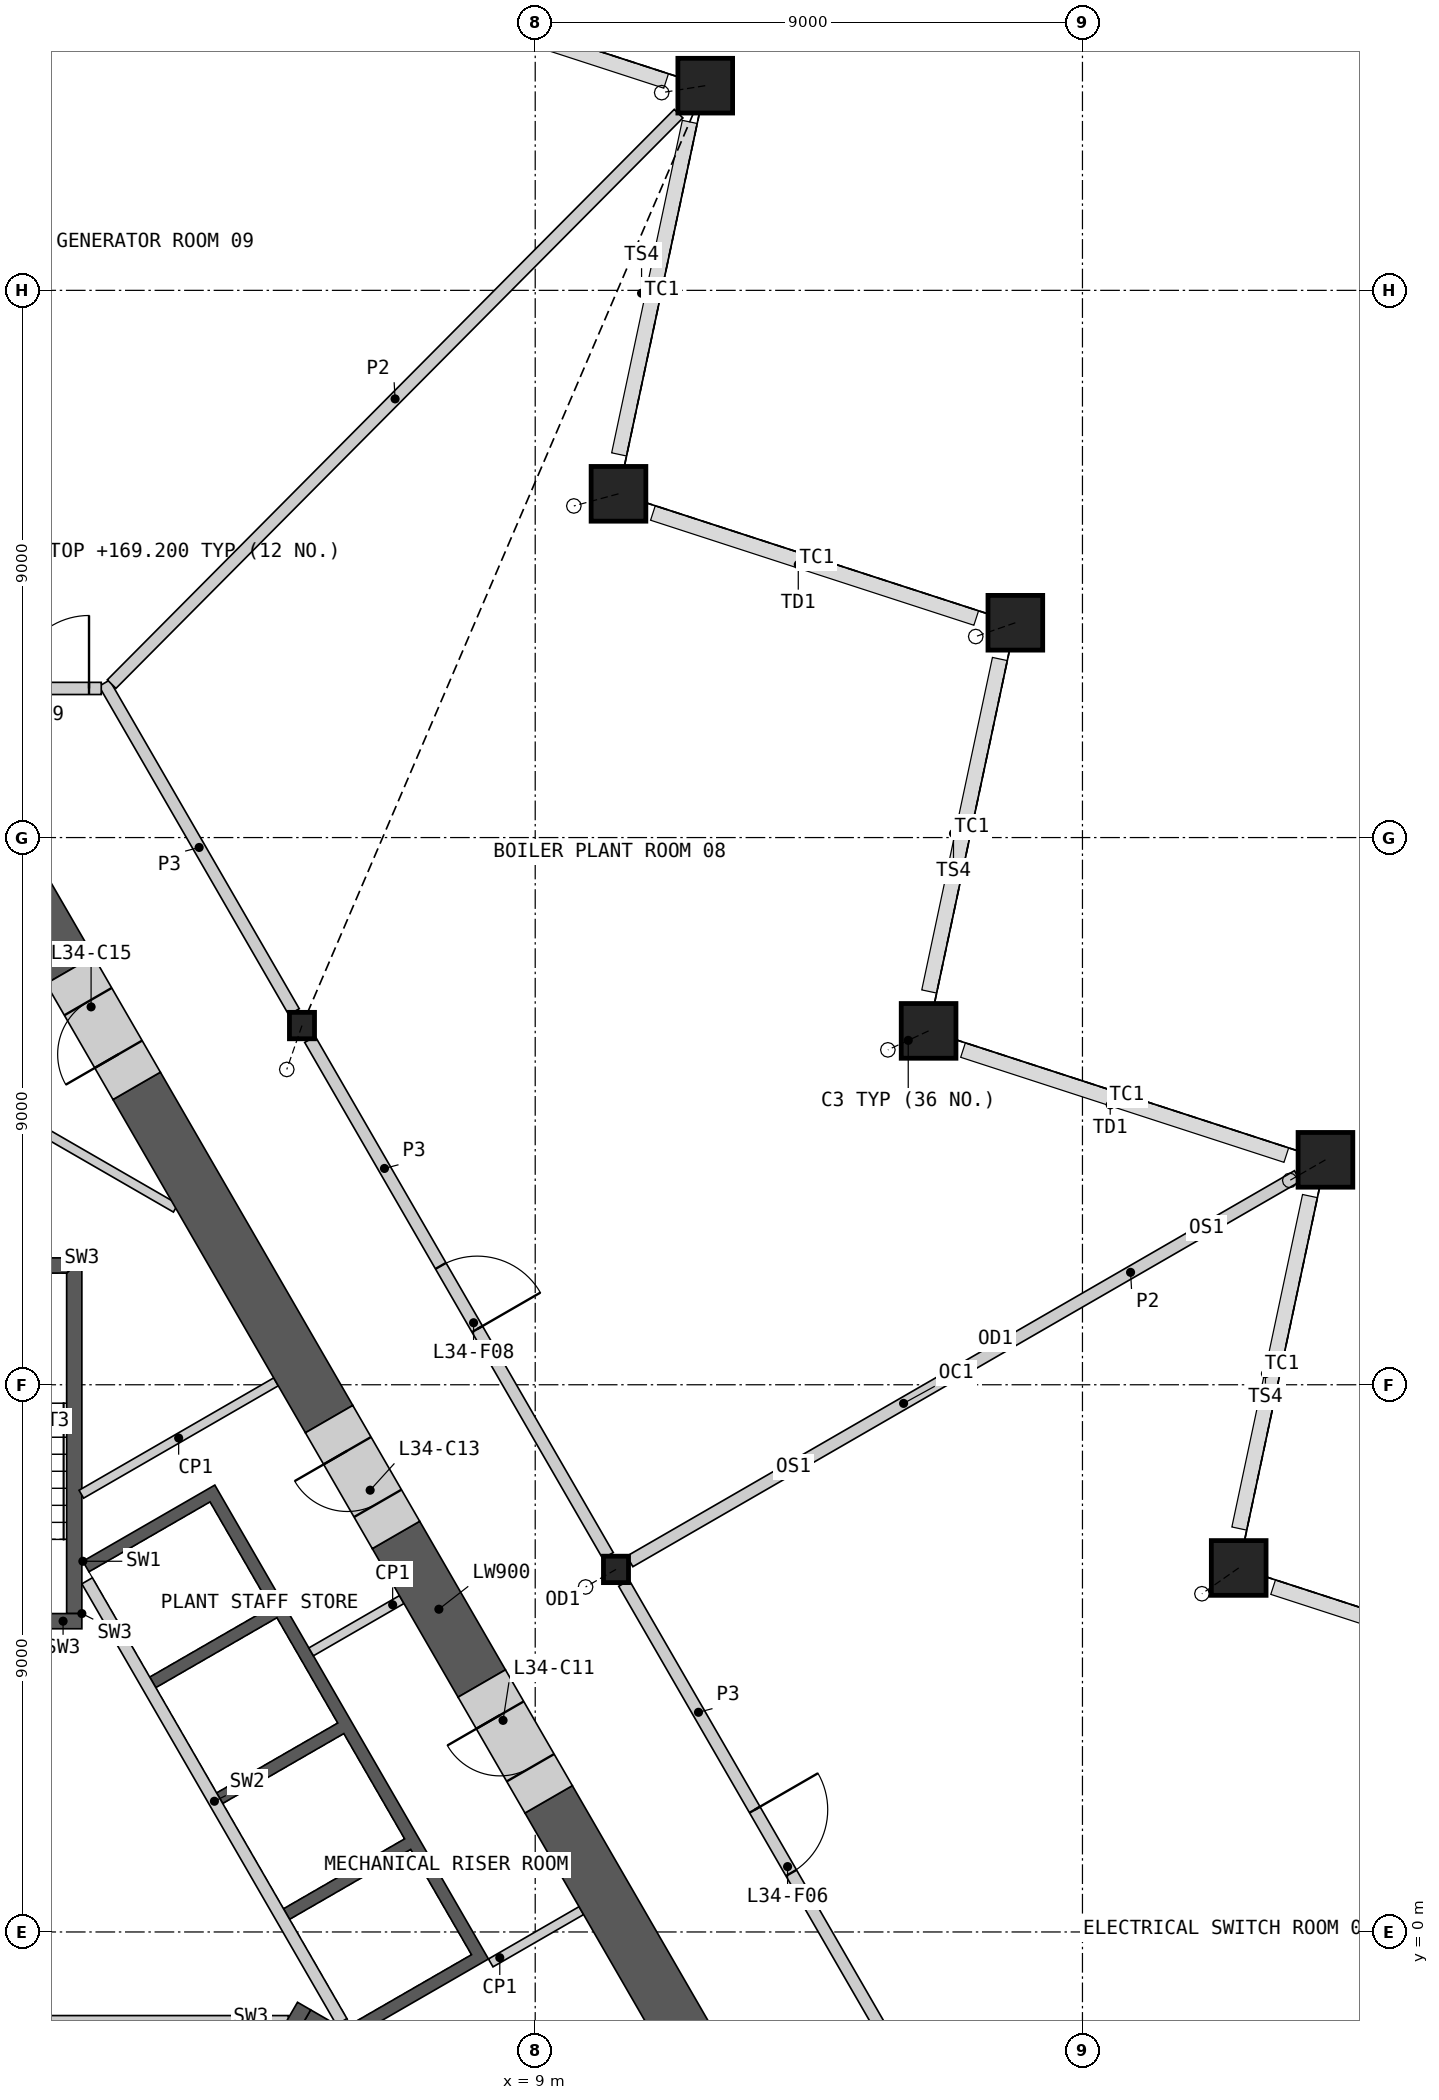
"""IFC4 building model, lengths in metres.
Left out: names, types, materials, properties, quantities, classifications, styles, units other than length and angle.
Written with IfcOpenShell. Run it as: python <this file> out.ifc"""

import sys

from ifc_helpers import new_model, si_unit, direction, frame, frame_2d, origin, origin_2d, place, context, subcontext, project, spatial, polyline, rectangle, hollow_rectangle, i_section, outline, extrude, element, fill, save


model = new_model("IFC4")
c1 = context("Model", 3, precision=1e-05, world=origin(), true_north=direction((0.0, 1.0)))
c2 = subcontext(c1, "Body", "Model", "MODEL_VIEW")
j1 = project(units=[si_unit("LENGTHUNIT", "METRE"), si_unit("PLANEANGLEUNIT", "RADIAN")], contexts=[c1])
p1 = place(None, origin())
s1 = spatial("IfcSite", under=j1, at=p1, CompositionType="ELEMENT")
p2 = place(p1, origin())
s2 = spatial("IfcBuilding", under=s1, at=p2, CompositionType="ELEMENT")
p3 = place(p2, frame((0.0, 0.0, 164.2)))
s3 = spatial("IfcBuildingStorey", under=s2, at=p3, CompositionType="ELEMENT", Elevation=164.2)
p4 = place(p3, frame((20.57, 5.987, 0.0), z_axis=(-0.119696450413, -0.083903444055, 0.98925879922), x_axis=(0.573994494418, -0.81885915784, 0.0)))
e1 = element("IfcColumn", 1, at=p4, inside=s3, PredefinedType="COLUMN", context=c2, shape_type="SweptSolid", body=[
    extrude(hollow_rectangle(XDim=0.9, YDim=0.9, WallThickness=0.06, at=origin_2d()), frame((0.0, 0.0, 0.066)), (0.0, 0.0, 1.0), 4.921),
])
p5 = place(p3, frame((21.996, 12.699, 0.0), z_axis=(-0.116319547646, -0.067111153322, 0.990941903411), x_axis=(0.499743247872, -0.866173588957, 0.0)))
e2 = element("IfcColumn", 2, at=p5, inside=s3, PredefinedType="COLUMN", context=c2, shape_type="SweptSolid", body=[
    extrude(hollow_rectangle(XDim=0.9, YDim=0.9, WallThickness=0.06, at=origin_2d()), frame((0.0, 0.0, 0.061)), (0.0, 0.0, 1.0), 4.924),
])
p6 = place(p3, frame((15.469, 14.82, 0.0), z_axis=(-0.132496967738, -0.061732090692, 0.989259168529), x_axis=(0.422324571588, -0.90644467908, 0.0)))
e3 = element("IfcColumn", 3, at=p6, inside=s3, PredefinedType="COLUMN", context=c2, shape_type="SweptSolid", body=[
    extrude(hollow_rectangle(XDim=0.9, YDim=0.9, WallThickness=0.06, at=origin_2d()), frame((0.0, 0.0, 0.066)), (0.0, 0.0, 1.0), 4.921),
])
p7 = place(p3, frame((16.896, 21.533, 0.0), z_axis=(-0.129051656436, -0.044887532673, 0.990621410722), x_axis=(0.328520624941, -0.944496796706, 0.0)))
e4 = element("IfcColumn", 4, at=p7, inside=s3, PredefinedType="COLUMN", context=c2, shape_type="SweptSolid", body=[
    extrude(hollow_rectangle(XDim=0.9, YDim=0.9, WallThickness=0.06, at=origin_2d()), frame((0.0, 0.0, 0.062)), (0.0, 0.0, 1.0), 4.923),
])
p8 = place(p3, frame((10.37, 23.654, 0.0), z_axis=(-0.145202633779, -0.039486620489, 0.988613676795), x_axis=(0.262411582967, -0.964956041032, 0.0)))
e5 = element("IfcColumn", 5, at=p8, inside=s3, PredefinedType="COLUMN", context=c2, shape_type="SweptSolid", body=[
    extrude(hollow_rectangle(XDim=0.9, YDim=0.9, WallThickness=0.06, at=origin_2d()), frame((0.0, 0.0, 0.069)), (0.0, 0.0, 1.0), 4.921),
])
p9 = place(p3, frame((11.796, 30.366, 0.0), z_axis=(-0.141777553788, -0.022614824531, 0.989640184589), x_axis=(0.157517910379, -0.987516130455, 0.0)))
e6 = element("IfcColumn", 6, at=p9, inside=s3, PredefinedType="COLUMN", context=c2, shape_type="SweptSolid", body=[
    extrude(hollow_rectangle(XDim=0.9, YDim=0.9, WallThickness=0.06, at=origin_2d()), frame((0.0, 0.0, 0.065)), (0.0, 0.0, 1.0), 4.922),
])
p10 = place(p3, frame((10.328, 5.963, 0.0), z_axis=(-0.099340040995, -0.057333949442, 0.993400409954), x_axis=(0.499868889286, -0.866101087359, 0.0)))
e7 = element("IfcColumn", 7, at=p10, inside=s3, PredefinedType="COLUMN", context=c2, shape_type="SweptSolid", body=[
    extrude(i_section(OverallWidth=0.412, OverallDepth=0.435, WebThickness=0.036, FlangeThickness=0.057, at=origin_2d()), frame((0.0, 0.0, 0.025)), (0.0, 0.0, 1.0), 4.983),
])
p11 = place(p3, frame((5.164, 14.908, 0.0), z_axis=(-0.049426691836, -0.142680958073, 0.988533836719), x_axis=(0.944910039342, -0.327330135415, 0.0)))
e8 = element("IfcColumn", 8, at=p11, inside=s3, PredefinedType="COLUMN", context=c2, shape_type="SweptSolid", body=[
    extrude(i_section(OverallWidth=0.412, OverallDepth=0.435, WebThickness=0.036, FlangeThickness=0.057, at=origin_2d()), frame((0.0, 0.0, 0.033)), (0.0, 0.0, 1.0), 4.992),
])
p12 = place(p3, origin())
e9 = element("IfcWall", 9, at=p12, inside=s3, PredefinedType="SHEAR", context=c2, shape_type="SweptSolid", body=[
    extrude(outline(polyline([(1.561, 6.097), (3.731, 7.35), (8.231, -0.444), (6.061, -1.697), (5.96, -1.524), (7.952, -0.374), (6.952, 1.358), (4.96, 0.208), (4.861, 0.381), (6.852, 1.531), (5.852, 3.263), (3.861, 2.113), (3.76, 2.287), (5.752, 3.437), (4.752, 5.169), (2.76, 4.019), (2.66, 4.192), (4.652, 5.342), (3.652, 7.074), (1.66, 5.924), (1.561, 6.097)])), origin(), (0.0, 0.0, 1.0), 4.65),
])
p13 = place(p3, frame((5.817, -1.476, 0.0), z_axis=(0.0, 0.0, 1.0), x_axis=(-0.500002616675, 0.866023893041, 0.0)))
e10 = element("IfcWall", 10, at=p13, inside=s3, PredefinedType="SOLIDWALL", context=c2, shape_type="SweptSolid", body=[
    extrude(rectangle(XDim=8.373, YDim=0.2, at=frame_2d((4.187, 0.0))), origin(), (0.0, 0.0, 1.0), 4.65),
])
p14 = place(p3, frame((-4.941, -1.45, 0.0), z_axis=(0.0, 0.0, 1.0), x_axis=(1.0, 0.0, 0.0)))
e11 = element("IfcWall", 11, at=p14, inside=s3, PredefinedType="PARTITIONING", context=c2, shape_type="SweptSolid", body=[
    extrude(rectangle(XDim=9.882, YDim=0.15, at=frame_2d((4.941, 0.0))), origin(), (0.0, 0.0, 1.0), 4.65),
])
p15 = place(p14, frame((4.391, 0.0, 0.0)))
e12 = element("IfcOpeningElement", 12, at=p15, cuts=e11, PredefinedType="OPENING", context=c2, shape_type="SweptSolid", body=[
    extrude(rectangle(XDim=1.1, YDim=2.1, at=frame_2d((0.55, 1.05))), frame((0.0, 0.085, 0.0), z_axis=(0.0, -1.0, 0.0), x_axis=(1.0, 0.0, 0.0)), (0.0, 0.0, 1.0), 0.17),
])
p16 = place(p3, origin())
e13 = element("IfcWall", 13, at=p16, inside=s3, PredefinedType="SHEAR", context=c2, shape_type="SweptSolid", body=[
    extrude(outline(polyline([(10.032, -4.298), (10.374, -4.206), (5.307, -1.281), (5.182, -1.498), (10.032, -4.298)])), origin(), (0.0, 0.0, 1.0), 4.65),
])
p17 = place(p3, frame((3.655, -3.893, 0.0), z_axis=(0.0, 0.0, 1.0), x_axis=(0.499982516597, 0.866035497597, 0.0)))
e14 = element("IfcWall", 14, at=p17, inside=s3, PredefinedType="SHEAR", context=c2, shape_type="SweptSolid", body=[
    extrude(rectangle(XDim=3.088, YDim=0.25, at=frame_2d((1.544, 0.0))), origin(), (0.0, 0.0, 1.0), 4.65),
])
p18 = place(p17, frame((0.994, 0.0, 0.0)))
e15 = element("IfcOpeningElement", 15, at=p18, cuts=e14, PredefinedType="OPENING", context=c2, shape_type="SweptSolid", body=[
    extrude(rectangle(XDim=1.1, YDim=2.1, at=frame_2d((0.55, 1.05))), frame((0.0, 0.135, 0.0), z_axis=(0.0, -1.0, 0.0), x_axis=(1.0, 0.0, 0.0)), (0.0, 0.0, 1.0), 0.27),
])
p19 = place(p3, origin())
e16 = element("IfcWall", 16, at=p19, inside=s3, PredefinedType="SHEAR", context=c2, shape_type="SweptSolid", body=[
    extrude(outline(polyline([(1.544, 5.237), (1.544, 11.087), (1.294, 10.837), (1.294, 5.237), (1.544, 5.237)])), origin(), (0.0, 0.0, 1.0), 4.65),
])
p20 = place(p3, origin())
e17 = element("IfcWall", 17, at=p20, inside=s3, PredefinedType="SHEAR", context=c2, shape_type="SweptSolid", body=[
    extrude(outline(polyline([(1.544, 11.087), (-1.544, 11.087), (-1.294, 10.837), (1.294, 10.837), (1.544, 11.087)])), origin(), (0.0, 0.0, 1.0), 4.65),
])
p21 = place(p3, frame((1.544, 5.112, 0.0), z_axis=(0.0, 0.0, 1.0), x_axis=(-1.0, 0.0, 0.0)))
e18 = element("IfcWall", 18, at=p21, inside=s3, PredefinedType="SHEAR", context=c2, shape_type="SweptSolid", body=[
    extrude(rectangle(XDim=3.088, YDim=0.25, at=frame_2d((1.544, 0.0))), origin(), (0.0, 0.0, 1.0), 4.65),
])
p22 = place(p21, frame((0.994, 0.0, 0.0)))
e19 = element("IfcOpeningElement", 19, at=p22, cuts=e18, PredefinedType="OPENING", context=c2, shape_type="SweptSolid", body=[
    extrude(rectangle(XDim=1.1, YDim=2.1, at=frame_2d((0.55, 1.05))), frame((0.0, 0.135, 0.0), z_axis=(0.0, -1.0, 0.0), x_axis=(1.0, 0.0, 0.0)), (0.0, 0.0, 1.0), 0.27),
])
for number, where, z_axis, x_axis in (
    (20, (8.268, -0.509, 0.0), (0.0, 0.0, 1.0), (0.866, 0.5, 0.0)),
    (21, (6.804, 5.467, 0.0), (0.0, 0.0, 1.0), (-0.866, -0.5, 0.0)),
):
    element("IfcWall", number, at=place(p3, frame(where, z_axis=z_axis, x_axis=x_axis)), inside=s3, PredefinedType="PARTITIONING", context=c2, shape_type="SweptSolid", body=[
        extrude(rectangle(XDim=1.72, YDim=0.15, at=frame_2d((0.86, 0.0))), origin(), (0.0, 0.0, 1.0), 4.65),
    ])
p23 = place(p3, frame((4.737, 9.048, 0.0), z_axis=(0.0, 0.0, 1.0), x_axis=(-0.866019514948, -0.500010199624, 0.0)))
e22 = element("IfcWall", 22, at=p23, inside=s3, PredefinedType="PARTITIONING", context=c2, shape_type="SweptSolid", body=[
    extrude(rectangle(XDim=3.697, YDim=0.15, at=frame_2d((1.848, 0.0))), origin(), (0.0, 0.0, 1.0), 4.65),
])
p24 = place(p3, frame((-1.544, 14.579, 0.0), z_axis=(0.0, 0.0, 1.0), x_axis=(0.866040373927, -0.499974070055, 0.0)))
e23 = element("IfcWall", 23, at=p24, inside=s3, PredefinedType="PARTITIONING", context=c2, shape_type="SweptSolid", body=[
    extrude(rectangle(XDim=5.347, YDim=0.15, at=frame_2d((2.674, 0.0))), origin(), (0.0, 0.0, 1.0), 4.65),
])
p25 = place(p3, frame((5.61, 8.435, 0.0), z_axis=(0.0, 0.0, 1.0), x_axis=(-0.500014073873, 0.866017278078, 0.0)))
e24 = element("IfcWall", 24, at=p25, inside=s3, PredefinedType="SHEAR", context=c2, shape_type="SweptSolid", body=[
    extrude(rectangle(XDim=6.329, YDim=0.9, at=frame_2d((3.165, 0.0))), origin(), (0.0, 0.0, 1.0), 4.65),
])
p26 = place(p3, frame((12.208, -2.992, 0.0), z_axis=(0.0, 0.0, 1.0), x_axis=(-0.499993658486, 0.866029065029, 0.0)))
e25 = element("IfcWall", 25, at=p26, inside=s3, PredefinedType="SHEAR", context=c2, shape_type="SweptSolid", body=[
    extrude(rectangle(XDim=5.974, YDim=0.9, at=frame_2d((2.987, 0.0))), origin(), (0.0, 0.0, 1.0), 4.65),
])
p27 = place(p3, frame((8.121, 4.087, 0.0), z_axis=(0.0, 0.0, 1.0), x_axis=(-0.50009448556, 0.865970845648, 0.0)))
e26 = element("IfcWall", 26, at=p27, inside=s3, PredefinedType="SHEAR", context=c2, shape_type="SweptSolid", body=[
    extrude(rectangle(XDim=2.821, YDim=0.9, at=frame_2d((1.411, 0.0))), origin(), (0.0, 0.0, 1.0), 4.65),
])
p28 = place(p3, frame((1.346, 15.822, 0.0), z_axis=(0.0, 0.0, 1.0), x_axis=(-0.500079771016, 0.865979343068, 0.0)))
e27 = element("IfcWall", 27, at=p28, inside=s3, PredefinedType="SHEAR", context=c2, shape_type="SweptSolid", body=[
    extrude(rectangle(XDim=1.912, YDim=0.9, at=frame_2d((0.956, 0.0))), origin(), (0.0, 0.0, 1.0), 4.65),
])
p29 = place(p3, frame((9.221, 2.181, 0.0), z_axis=(0.0, 0.0, 1.0), x_axis=(-0.499946605688, 0.86605622881, 0.0)))
e28 = element("IfcWall", 28, at=p29, inside=s3, PredefinedType="SHEAR", context=c2, shape_type="SweptSolid", body=[
    extrude(rectangle(XDim=2.2, YDim=0.9, at=frame_2d((1.1, 0.0))), origin(), (0.0, 0.0, 1.0), 4.65),
])
p30 = place(p29, frame((0.6, 0.0, 0.0)))
e29 = element("IfcOpeningElement", 29, at=p30, cuts=e28, PredefinedType="OPENING", context=c2, shape_type="SweptSolid", body=[
    extrude(rectangle(XDim=1.0, YDim=2.1, at=frame_2d((0.5, 1.05))), frame((0.0, 0.46, 0.0), z_axis=(0.0, -1.0, 0.0), x_axis=(1.0, 0.0, 0.0)), (0.0, 0.0, 1.0), 0.92),
])
p31 = place(p3, frame((6.71, 6.53, 0.0), z_axis=(0.0, 0.0, 1.0), x_axis=(-0.499898558967, 0.866083962871, 0.0)))
e30 = element("IfcWall", 30, at=p31, inside=s3, PredefinedType="SHEAR", context=c2, shape_type="SweptSolid", body=[
    extrude(rectangle(XDim=2.2, YDim=0.9, at=frame_2d((1.1, 0.0))), origin(), (0.0, 0.0, 1.0), 4.65),
])
p32 = place(p31, frame((0.6, 0.0, 0.0)))
e31 = element("IfcOpeningElement", 31, at=p32, cuts=e30, PredefinedType="OPENING", context=c2, shape_type="SweptSolid", body=[
    extrude(rectangle(XDim=1.0, YDim=2.1, at=frame_2d((0.5, 1.05))), frame((0.0, 0.46, 0.0), z_axis=(0.0, -1.0, 0.0), x_axis=(1.0, 0.0, 0.0)), (0.0, 0.0, 1.0), 0.92),
])
p33 = place(p3, frame((2.446, 13.916, 0.0), z_axis=(0.0, 0.0, 1.0), x_axis=(-0.499946605688, 0.86605622881, 0.0)))
e32 = element("IfcWall", 32, at=p33, inside=s3, PredefinedType="SHEAR", context=c2, shape_type="SweptSolid", body=[
    extrude(rectangle(XDim=2.2, YDim=0.9, at=frame_2d((1.1, 0.0))), origin(), (0.0, 0.0, 1.0), 4.65),
])
p34 = place(p33, frame((0.6, 0.0, 0.0)))
e33 = element("IfcOpeningElement", 33, at=p34, cuts=e32, PredefinedType="OPENING", context=c2, shape_type="SweptSolid", body=[
    extrude(rectangle(XDim=1.0, YDim=2.1, at=frame_2d((0.5, 1.05))), frame((0.0, 0.46, 0.0), z_axis=(0.0, -1.0, 0.0), x_axis=(1.0, 0.0, 0.0)), (0.0, 0.0, 1.0), 0.92),
])
p35 = place(p3, frame((10.46, 5.736, 0.0), z_axis=(0.0, 0.0, 1.0), x_axis=(0.500004141693, -0.866023012564, 0.0)))
e34 = element("IfcWall", 34, at=p35, inside=s3, PredefinedType="PARTITIONING", context=c2, shape_type="SweptSolid", body=[
    extrude(rectangle(XDim=9.803, YDim=0.2, at=frame_2d((4.902, 0.0))), origin(), (0.0, 0.0, 1.0), 4.65),
])
p36 = place(p35, frame((4.302, 0.0, 0.0)))
e35 = element("IfcOpeningElement", 35, at=p36, cuts=e34, PredefinedType="OPENING", context=c2, shape_type="SweptSolid", body=[
    extrude(rectangle(XDim=1.2, YDim=2.1, at=frame_2d((0.6, 1.05))), frame((0.0, 0.11, 0.0), z_axis=(0.0, -1.0, 0.0), x_axis=(1.0, 0.0, 0.0)), (0.0, 0.0, 1.0), 0.22),
])
p37 = place(p3, frame((5.295, 14.68, 0.0), z_axis=(0.0, 0.0, 1.0), x_axis=(0.500012035596, -0.866018454918, 0.0)))
e36 = element("IfcWall", 36, at=p37, inside=s3, PredefinedType="PARTITIONING", context=c2, shape_type="SweptSolid", body=[
    extrude(rectangle(XDim=9.803, YDim=0.2, at=frame_2d((4.902, 0.0))), origin(), (0.0, 0.0, 1.0), 4.65),
])
p38 = place(p37, frame((4.302, 0.0, 0.0)))
e37 = element("IfcOpeningElement", 37, at=p38, cuts=e36, PredefinedType="OPENING", context=c2, shape_type="SweptSolid", body=[
    extrude(rectangle(XDim=1.2, YDim=2.1, at=frame_2d((0.6, 1.05))), frame((0.0, 0.11, 0.0), z_axis=(0.0, -1.0, 0.0), x_axis=(1.0, 0.0, 0.0)), (0.0, 0.0, 1.0), 0.22),
])
p39 = place(p3, frame((1.913, 20.539, 0.0), z_axis=(0.0, 0.0, 1.0), x_axis=(0.499980978912, -0.866036385336, 0.0)))
e38 = element("IfcWall", 38, at=p39, inside=s3, PredefinedType="PARTITIONING", context=c2, shape_type="SweptSolid", body=[
    extrude(rectangle(XDim=6.24, YDim=0.2, at=frame_2d((3.12, 0.0))), origin(), (0.0, 0.0, 1.0), 4.65),
])
p40 = place(p3, frame((-1.863, 20.453, 0.0), z_axis=(0.0, 0.0, 1.0), x_axis=(1.0, 0.0, 0.0)))
e39 = element("IfcWall", 39, at=p40, inside=s3, PredefinedType="PARTITIONING", context=c2, shape_type="SweptSolid", body=[
    extrude(rectangle(XDim=3.726, YDim=0.2, at=frame_2d((1.863, 0.0))), origin(), (0.0, 0.0, 1.0), 4.65),
])
p41 = place(p40, frame((2.325, 0.0, 0.0)))
e40 = element("IfcOpeningElement", 40, at=p41, cuts=e39, PredefinedType="OPENING", context=c2, shape_type="SweptSolid", body=[
    extrude(rectangle(XDim=1.2, YDim=2.1, at=frame_2d((0.6, 1.05))), frame((0.0, 0.11, 0.0), z_axis=(0.0, -1.0, 0.0), x_axis=(1.0, 0.0, 0.0)), (0.0, 0.0, 1.0), 0.22),
])
p42 = place(p3, frame((2.033, 20.523, 0.0), z_axis=(0.0, 0.0, 1.0), x_axis=(0.704897825138, 0.709308858055, 0.0)))
e41 = element("IfcWall", 41, at=p42, inside=s3, PredefinedType="PARTITIONING", context=c2, shape_type="SweptSolid", body=[
    extrude(rectangle(XDim=13.228, YDim=0.2, at=frame_2d((6.614, 0.0))), origin(), (0.0, 0.0, 1.0), 4.65),
])
p43 = place(p3, frame((10.556, 6.094, 0.0), z_axis=(0.0, 0.0, 1.0), x_axis=(0.86602461759, 0.500001361726, 0.0)))
e42 = element("IfcWall", 42, at=p43, inside=s3, PredefinedType="PARTITIONING", context=c2, shape_type="SweptSolid", body=[
    extrude(rectangle(XDim=12.679, YDim=0.2, at=frame_2d((6.34, 0.0))), origin(), (0.0, 0.0, 1.0), 4.65),
])
p44 = place(p30, origin())
e43 = element("IfcDoor", 43, at=p44, inside=s3, OperationType="SINGLE_SWING_RIGHT", PredefinedType="DOOR", context=c2, shape_type="SweptSolid", body=[
    extrude(rectangle(XDim=1.0, YDim=2.1, at=frame_2d((0.5, 1.05))), frame((0.0, 0.205, 0.0), z_axis=(0.0, -1.0, 0.0), x_axis=(1.0, 0.0, 0.0)), (0.0, 0.0, 1.0), 0.05),
])
fill(e29, e43)
p45 = place(p32, origin())
e44 = element("IfcDoor", 44, at=p45, inside=s3, OperationType="SINGLE_SWING_RIGHT", PredefinedType="DOOR", context=c2, shape_type="SweptSolid", body=[
    extrude(rectangle(XDim=1.0, YDim=2.1, at=frame_2d((0.5, 1.05))), frame((0.0, 0.205, 0.0), z_axis=(0.0, -1.0, 0.0), x_axis=(1.0, 0.0, 0.0)), (0.0, 0.0, 1.0), 0.05),
])
fill(e31, e44)
p46 = place(p34, origin())
e45 = element("IfcDoor", 45, at=p46, inside=s3, OperationType="SINGLE_SWING_LEFT", PredefinedType="DOOR", context=c2, shape_type="SweptSolid", body=[
    extrude(rectangle(XDim=1.0, YDim=2.1, at=frame_2d((0.5, 1.05))), frame((0.0, 0.205, 0.0), z_axis=(0.0, -1.0, 0.0), x_axis=(1.0, 0.0, 0.0)), (0.0, 0.0, 1.0), 0.05),
])
fill(e33, e45)
p47 = place(p36, origin())
e46 = element("IfcDoor", 46, at=p47, inside=s3, OperationType="SINGLE_SWING_LEFT", PredefinedType="DOOR", context=c2, shape_type="SweptSolid", body=[
    extrude(rectangle(XDim=1.2, YDim=2.1, at=frame_2d((0.6, 1.05))), frame((0.0, 0.025, 0.0), z_axis=(0.0, -1.0, 0.0), x_axis=(1.0, 0.0, 0.0)), (0.0, 0.0, 1.0), 0.05),
])
fill(e35, e46)
p48 = place(p38, origin())
e47 = element("IfcDoor", 47, at=p48, inside=s3, OperationType="SINGLE_SWING_RIGHT", PredefinedType="DOOR", context=c2, shape_type="SweptSolid", body=[
    extrude(rectangle(XDim=1.2, YDim=2.1, at=frame_2d((0.6, 1.05))), frame((0.0, 0.025, 0.0), z_axis=(0.0, -1.0, 0.0), x_axis=(1.0, 0.0, 0.0)), (0.0, 0.0, 1.0), 0.05),
])
fill(e37, e47)
p49 = place(p41, origin())
e48 = element("IfcDoor", 48, at=p49, inside=s3, OperationType="SINGLE_SWING_RIGHT", PredefinedType="DOOR", context=c2, shape_type="SweptSolid", body=[
    extrude(rectangle(XDim=1.2, YDim=2.1, at=frame_2d((0.6, 1.05))), frame((0.0, 0.025, 0.0), z_axis=(0.0, -1.0, 0.0), x_axis=(1.0, 0.0, 0.0)), (0.0, 0.0, 1.0), 0.05),
])
fill(e40, e48)
save(model, sys.argv[1])
